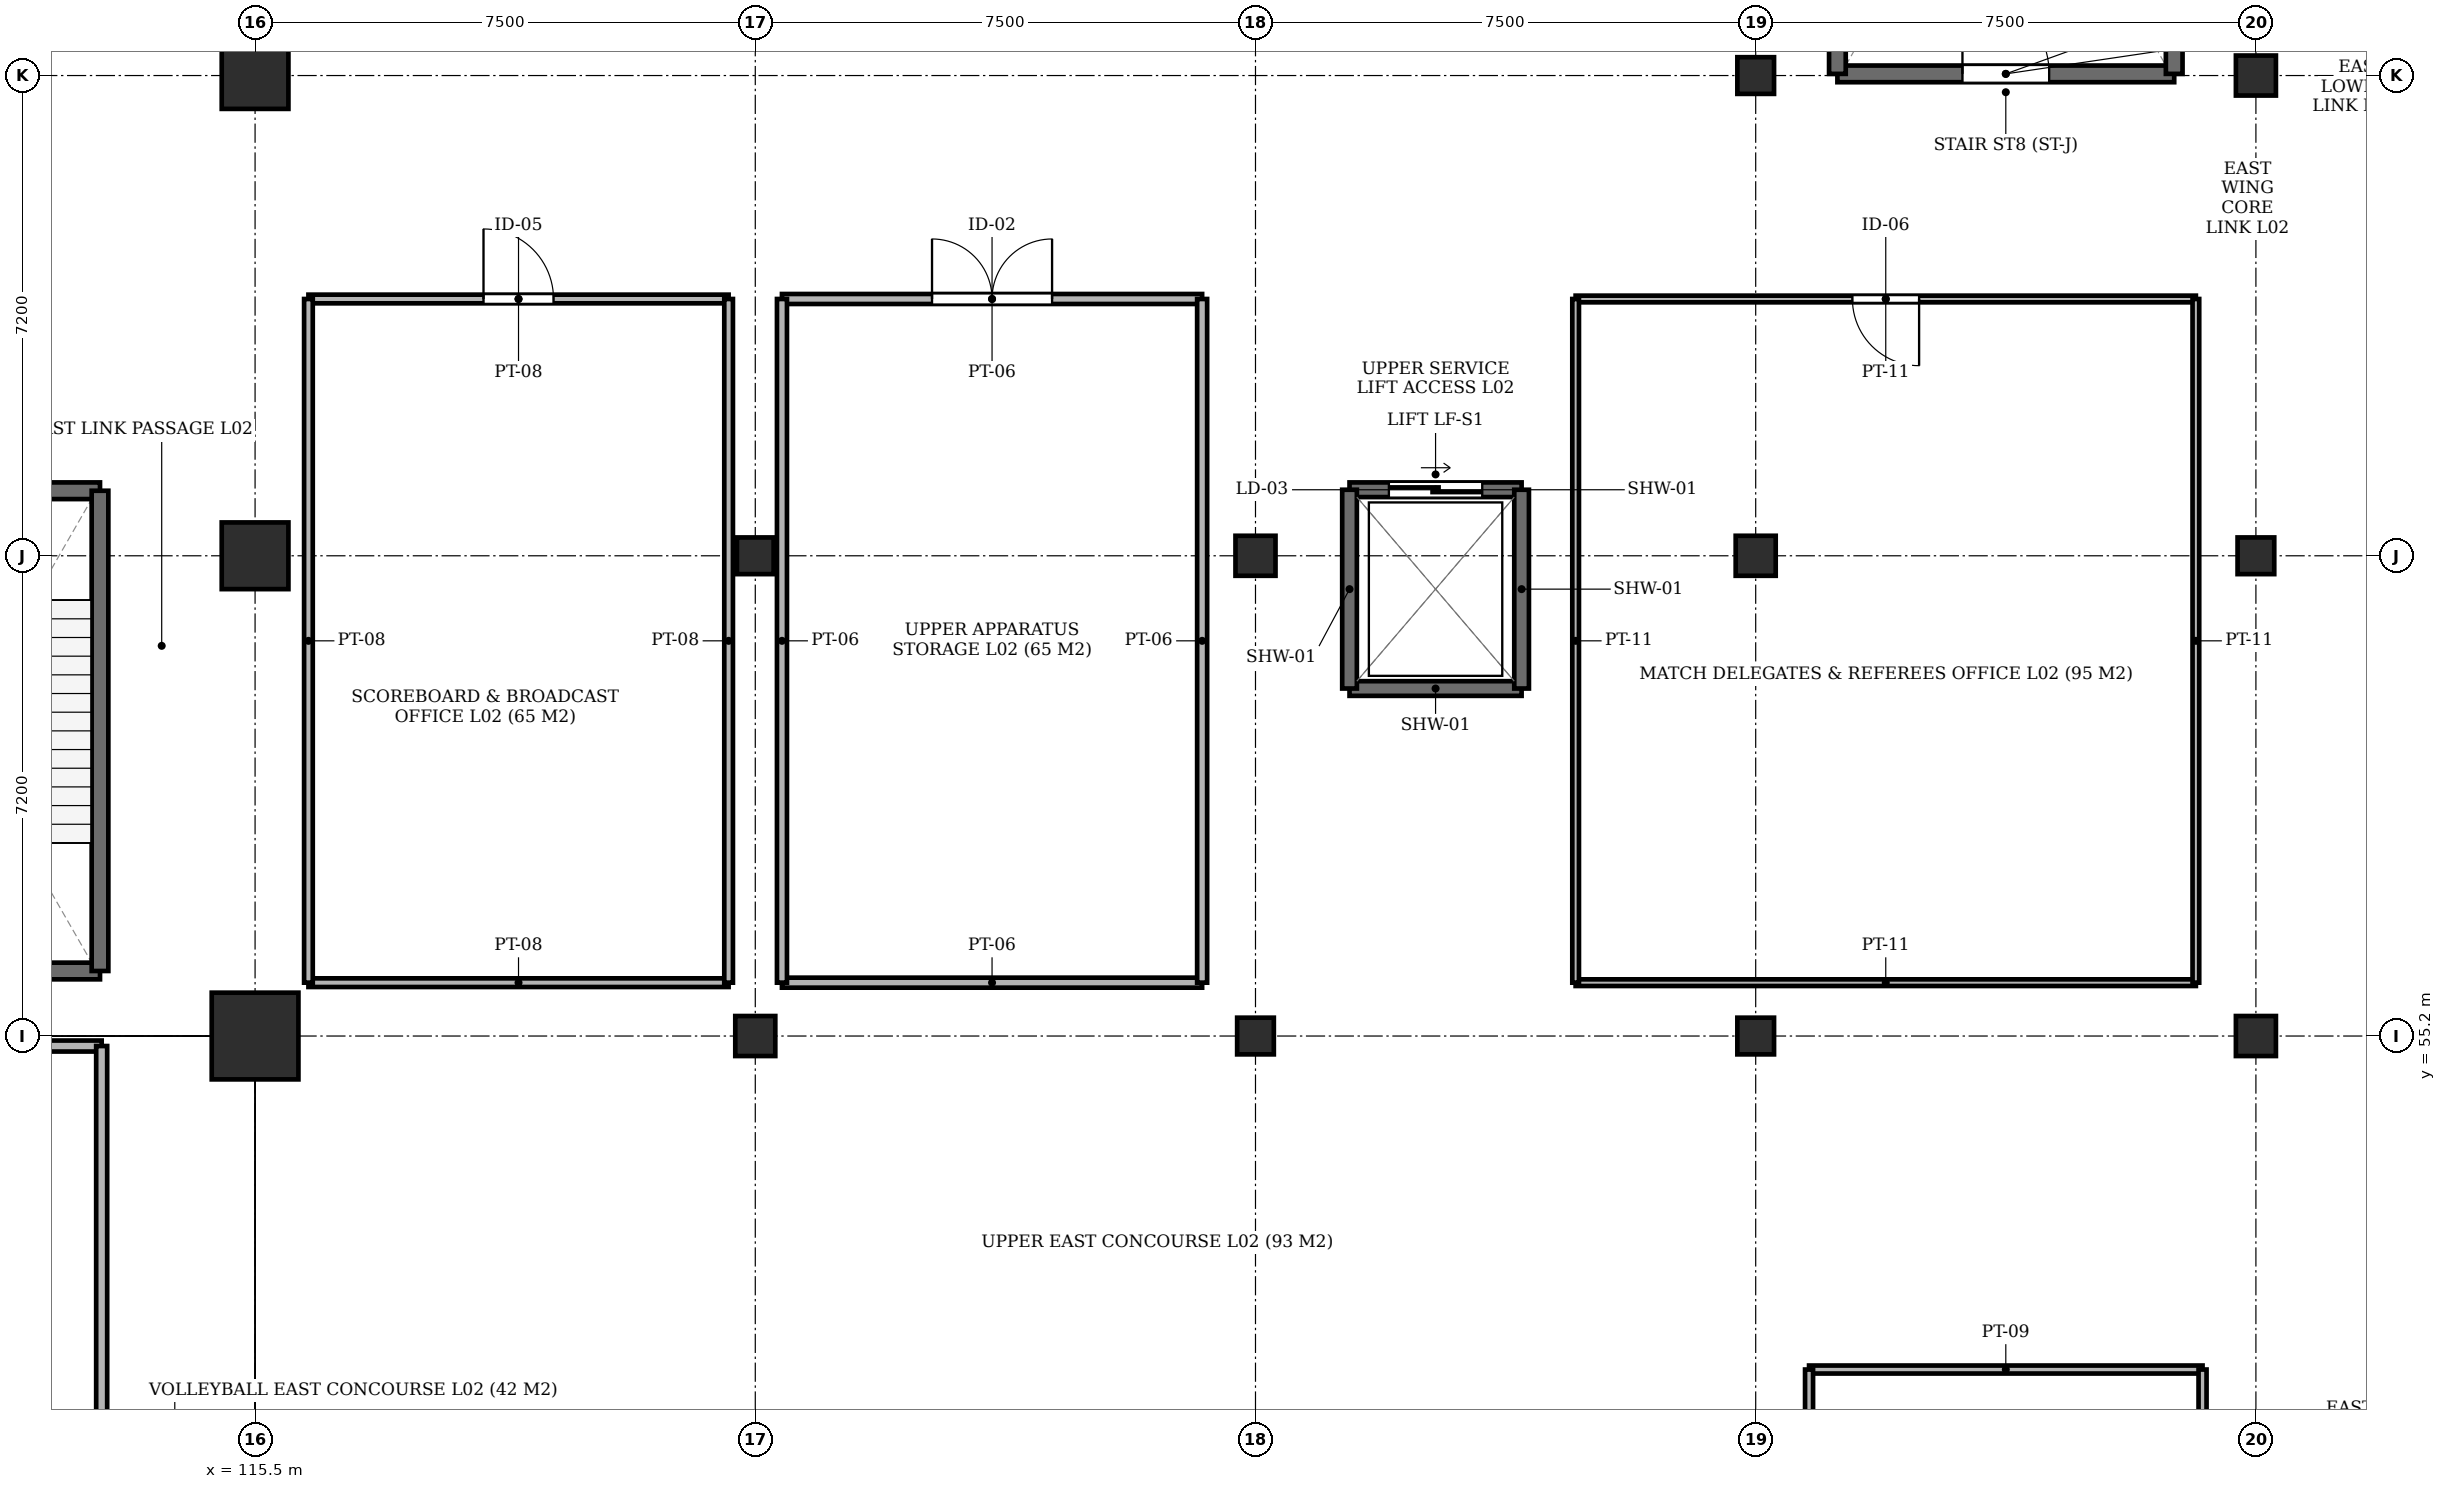
"""IFC4 building model, lengths in metres.
Left out: names, types, materials, properties, quantities, classifications, styles, units other than length and angle.
Written with IfcOpenShell. Run it as: python <this file> out.ifc"""

import sys

from ifc_helpers import new_model, si_unit, direction, frame, frame_2d, origin, origin_2d, place, context, subcontext, project, spatial, rectangle, extrude, element, fill, save


model = new_model("IFC4")
c1 = context("Model", 3, precision=1e-05, world=origin(), true_north=direction((0.0, 1.0)))
c2 = subcontext(c1, "Body", "Model", "MODEL_VIEW")
j1 = project(units=[si_unit("LENGTHUNIT", "METRE"), si_unit("PLANEANGLEUNIT", "RADIAN")], contexts=[c1])
p1 = place(None, origin())
s1 = spatial("IfcSite", under=j1, at=p1, CompositionType="ELEMENT")
p2 = place(p1, origin())
s2 = spatial("IfcBuilding", under=s1, at=p2, CompositionType="ELEMENT")
p3 = place(p2, frame((0.0, 0.0, 9.4)))
s3 = spatial("IfcBuildingStorey", under=s2, at=p3, CompositionType="ELEMENT", Elevation=9.4)
p4 = place(p3, frame((115.5, 55.2, -0.45), z_axis=(0.0, 0.0, 1.0), x_axis=(1.0, 0.0, 0.0)))
e1 = element("IfcColumn", 1, at=p4, inside=s3, PredefinedType="COLUMN", context=c2, shape_type="SweptSolid", body=[
    extrude(rectangle(XDim=1.3, YDim=1.3, at=origin_2d()), origin(), (0.0, 0.0, 1.0), 4.77),
])
for number, where, z_axis, x_axis in (
    (2, (115.5, 62.4, -0.45), (0.0, 0.0, 1.0), (1.0, 0.0, 0.0)),
    (3, (115.5, 69.6, -0.45), (0.0, 0.0, 1.0), (1.0, 0.0, 0.0)),
):
    element("IfcColumn", number, at=place(p3, frame(where, z_axis=z_axis, x_axis=x_axis)), inside=s3, PredefinedType="COLUMN", context=c2, shape_type="SweptSolid", body=[
        extrude(rectangle(XDim=1.0, YDim=1.0, at=origin_2d()), origin(), (0.0, 0.0, 1.0), 4.77),
    ])
p5 = place(p3, frame((123.0, 55.2, -0.45), z_axis=(0.0, 0.0, 1.0), x_axis=(1.0, 0.0, 0.0)))
e4 = element("IfcColumn", 4, at=p5, inside=s3, PredefinedType="COLUMN", context=c2, shape_type="SweptSolid", body=[
    extrude(rectangle(XDim=0.6, YDim=0.6, at=origin_2d()), origin(), (0.0, 0.0, 1.0), 4.77),
])
for number, where, z_axis, x_axis in (
    (5, (123.0, 62.4, -0.45), (0.0, 0.0, 1.0), (1.0, 0.0, 0.0)),
    (6, (130.5, 55.2, -0.45), (0.0, 0.0, 1.0), (1.0, 0.0, 0.0)),
):
    element("IfcColumn", number, at=place(p3, frame(where, z_axis=z_axis, x_axis=x_axis)), inside=s3, PredefinedType="COLUMN", context=c2, shape_type="SweptSolid", body=[
        extrude(rectangle(XDim=0.55, YDim=0.55, at=origin_2d()), origin(), (0.0, 0.0, 1.0), 4.77),
    ])
p6 = place(p3, frame((130.5, 62.4, -0.45), z_axis=(0.0, 0.0, 1.0), x_axis=(1.0, 0.0, 0.0)))
e7 = element("IfcColumn", 7, at=p6, inside=s3, PredefinedType="COLUMN", context=c2, shape_type="SweptSolid", body=[
    extrude(rectangle(XDim=0.6, YDim=0.6, at=origin_2d()), origin(), (0.0, 0.0, 1.0), 4.77),
])
p7 = place(p3, frame((138.0, 55.2, -0.45), z_axis=(0.0, 0.0, 1.0), x_axis=(1.0, 0.0, 0.0)))
e8 = element("IfcColumn", 8, at=p7, inside=s3, PredefinedType="COLUMN", context=c2, shape_type="SweptSolid", body=[
    extrude(rectangle(XDim=0.55, YDim=0.55, at=origin_2d()), origin(), (0.0, 0.0, 1.0), 4.77),
])
p8 = place(p3, frame((138.0, 62.4, -0.45), z_axis=(0.0, 0.0, 1.0), x_axis=(1.0, 0.0, 0.0)))
e9 = element("IfcColumn", 9, at=p8, inside=s3, PredefinedType="COLUMN", context=c2, shape_type="SweptSolid", body=[
    extrude(rectangle(XDim=0.6, YDim=0.6, at=origin_2d()), origin(), (0.0, 0.0, 1.0), 4.77),
])
p9 = place(p3, frame((138.0, 69.6, -0.45), z_axis=(0.0, 0.0, 1.0), x_axis=(1.0, 0.0, 0.0)))
e10 = element("IfcColumn", 10, at=p9, inside=s3, PredefinedType="COLUMN", context=c2, shape_type="SweptSolid", body=[
    extrude(rectangle(XDim=0.55, YDim=0.55, at=origin_2d()), origin(), (0.0, 0.0, 1.0), 4.77),
])
p10 = place(p3, frame((145.5, 55.2, -0.45), z_axis=(0.0, 0.0, 1.0), x_axis=(1.0, 0.0, 0.0)))
e11 = element("IfcColumn", 11, at=p10, inside=s3, PredefinedType="COLUMN", context=c2, shape_type="SweptSolid", body=[
    extrude(rectangle(XDim=0.6, YDim=0.6, at=origin_2d()), origin(), (0.0, 0.0, 1.0), 4.77),
])
p11 = place(p3, frame((145.5, 62.4, -0.45), z_axis=(0.0, 0.0, 1.0), x_axis=(1.0, 0.0, 0.0)))
e12 = element("IfcColumn", 12, at=p11, inside=s3, PredefinedType="COLUMN", context=c2, shape_type="SweptSolid", body=[
    extrude(rectangle(XDim=0.55, YDim=0.55, at=origin_2d()), origin(), (0.0, 0.0, 1.0), 4.77),
])
p12 = place(p3, frame((145.5, 69.6, -0.45), z_axis=(0.0, 0.0, 1.0), x_axis=(1.0, 0.0, 0.0)))
e13 = element("IfcColumn", 13, at=p12, inside=s3, PredefinedType="COLUMN", context=c2, shape_type="SweptSolid", body=[
    extrude(rectangle(XDim=0.6, YDim=0.6, at=origin_2d()), origin(), (0.0, 0.0, 1.0), 4.77),
])
p13 = place(p3, frame((139.225, 69.625, 0.0), z_axis=(0.0, 0.0, 1.0), x_axis=(1.0, 0.0, 0.0)))
e14 = element("IfcWall", 14, at=p13, inside=s3, PredefinedType="SHEAR", context=c2, shape_type="SweptSolid", body=[
    extrude(rectangle(XDim=5.05, YDim=0.25, at=frame_2d((2.525, 0.0))), origin(), (0.0, 0.0, 1.0), 4.32),
])
p14 = place(p13, frame((1.875, 0.0, 0.0)))
e15 = element("IfcOpeningElement", 15, at=p14, cuts=e14, PredefinedType="OPENING", context=c2, shape_type="SweptSolid", body=[
    extrude(rectangle(XDim=1.3, YDim=2.2, at=frame_2d((0.65, 1.1))), frame((0.0, 0.137, 0.0), z_axis=(0.0, -1.0, 0.0), x_axis=(1.0, 0.0, 0.0)), (0.0, 0.0, 1.0), 0.274),
])
for number, where, z_axis, x_axis in (
    (16, (139.225, 78.325, 0.0), (0.0, 0.0, 1.0), (0.0, -1.0, 0.0)),
    (17, (144.275, 69.625, 0.0), (0.0, 0.0, 1.0), (0.0, 1.0, 0.0)),
):
    element("IfcWall", number, at=place(p3, frame(where, z_axis=z_axis, x_axis=x_axis)), inside=s3, PredefinedType="SHEAR", context=c2, shape_type="SweptSolid", body=[
        extrude(rectangle(XDim=8.7, YDim=0.25, at=frame_2d((4.35, 0.0))), origin(), (0.0, 0.0, 1.0), 4.32),
    ])
p15 = place(p3, frame((108.925, 56.175, 0.0), z_axis=(0.0, 0.0, 1.0), x_axis=(1.0, 0.0, 0.0)))
e18 = element("IfcWall", 18, at=p15, inside=s3, PredefinedType="SHEAR", context=c2, shape_type="SweptSolid", body=[
    extrude(rectangle(XDim=4.25, YDim=0.25, at=frame_2d((2.125, 0.0))), origin(), (0.0, 0.0, 1.0), 4.32),
])
p16 = place(p3, frame((113.175, 63.375, 0.0), z_axis=(0.0, 0.0, 1.0), x_axis=(-1.0, 0.0, 0.0)))
e19 = element("IfcWall", 19, at=p16, inside=s3, PredefinedType="SHEAR", context=c2, shape_type="SweptSolid", body=[
    extrude(rectangle(XDim=4.25, YDim=0.25, at=frame_2d((2.125, 0.0))), origin(), (0.0, 0.0, 1.0), 4.32),
])
p17 = place(p16, frame((1.525, 0.0, 0.0)))
e20 = element("IfcOpeningElement", 20, at=p17, cuts=e19, PredefinedType="OPENING", context=c2, shape_type="SweptSolid", body=[
    extrude(rectangle(XDim=1.2, YDim=2.2, at=frame_2d((0.6, 1.1))), frame((0.0, 0.137, 0.0), z_axis=(0.0, -1.0, 0.0), x_axis=(1.0, 0.0, 0.0)), (0.0, 0.0, 1.0), 0.274),
])
p18 = place(p3, frame((113.175, 56.175, 0.0), z_axis=(0.0, 0.0, 1.0), x_axis=(0.0, 1.0, 0.0)))
e21 = element("IfcWall", 21, at=p18, inside=s3, PredefinedType="SHEAR", context=c2, shape_type="SweptSolid", body=[
    extrude(rectangle(XDim=7.2, YDim=0.25, at=frame_2d((3.6, 0.0))), origin(), (0.0, 0.0, 1.0), 4.32),
])
p19 = place(p3, frame((131.91, 60.41, 0.0), z_axis=(0.0, 0.0, 1.0), x_axis=(1.0, 0.0, 0.0)))
e22 = element("IfcWall", 22, at=p19, inside=s3, PredefinedType="SHEAR", context=c2, shape_type="SweptSolid", body=[
    extrude(rectangle(XDim=2.58, YDim=0.22, at=frame_2d((1.29, 0.0))), origin(), (0.0, 0.0, 1.0), 4.32),
])
p20 = place(p3, frame((134.49, 63.39, 0.0), z_axis=(0.0, 0.0, 1.0), x_axis=(-1.0, 0.0, 0.0)))
e23 = element("IfcWall", 23, at=p20, inside=s3, PredefinedType="SHEAR", context=c2, shape_type="SweptSolid", body=[
    extrude(rectangle(XDim=2.58, YDim=0.22, at=frame_2d((1.29, 0.0))), origin(), (0.0, 0.0, 1.0), 4.32),
])
p21 = place(p20, frame((0.59, 0.0, 0.0)))
e24 = element("IfcOpeningElement", 24, at=p21, cuts=e23, PredefinedType="OPENING", context=c2, shape_type="SweptSolid", body=[
    extrude(rectangle(XDim=1.4, YDim=2.3, at=frame_2d((0.7, 1.15))), frame((0.0, 0.122, 0.0), z_axis=(0.0, -1.0, 0.0), x_axis=(1.0, 0.0, 0.0)), (0.0, 0.0, 1.0), 0.244),
])
for number, where, z_axis, x_axis in (
    (25, (131.91, 63.39, 0.0), (0.0, 0.0, 1.0), (0.0, -1.0, 0.0)),
    (26, (134.49, 60.41, 0.0), (0.0, 0.0, 1.0), (0.0, 1.0, 0.0)),
):
    element("IfcWall", number, at=place(p3, frame(where, z_axis=z_axis, x_axis=x_axis)), inside=s3, PredefinedType="SHEAR", context=c2, shape_type="SweptSolid", body=[
        extrude(rectangle(XDim=2.98, YDim=0.22, at=frame_2d((1.49, 0.0))), origin(), (0.0, 0.0, 1.0), 4.32),
    ])
p22 = place(p3, frame((108.73, 55.05, 0.0), z_axis=(0.0, 0.0, 1.0), x_axis=(1.0, 0.0, 0.0)))
e27 = element("IfcWall", 27, at=p22, inside=s3, PredefinedType="PARTITIONING", context=c2, shape_type="SweptSolid", body=[
    extrude(rectangle(XDim=4.47, YDim=0.165, at=frame_2d((2.235, 0.0))), origin(), (0.0, 0.0, 1.0), 3.8),
])
p23 = place(p3, frame((113.2, 28.95, 0.0), z_axis=(0.0, 0.0, 1.0), x_axis=(0.0, 1.0, 0.0)))
e28 = element("IfcWall", 28, at=p23, inside=s3, PredefinedType="PARTITIONING", context=c2, shape_type="SweptSolid", body=[
    extrude(rectangle(XDim=26.1, YDim=0.165, at=frame_2d((13.05, 0.0))), origin(), (0.0, 0.0, 1.0), 3.88),
])
p24 = place(p23, frame((12.05, 0.0, 0.0)))
e29 = element("IfcOpeningElement", 29, at=p24, cuts=e28, PredefinedType="OPENING", context=c2, shape_type="SweptSolid", body=[
    extrude(rectangle(XDim=2.0, YDim=2.35, at=frame_2d((1.0, 1.175))), frame((0.0, 0.094, 0.0), z_axis=(0.0, -1.0, 0.0), x_axis=(1.0, 0.0, 0.0)), (0.0, 0.0, 1.0), 0.189),
])
p25 = place(p3, frame((116.3, 56.0, 0.0), z_axis=(0.0, 0.0, 1.0), x_axis=(1.0, 0.0, 0.0)))
e30 = element("IfcWall", 30, at=p25, inside=s3, PredefinedType="PARTITIONING", context=c2, shape_type="SweptSolid", body=[
    extrude(rectangle(XDim=6.3, YDim=0.13, at=frame_2d((3.15, 0.0))), origin(), (0.0, 0.0, 1.0), 3.88),
])
p26 = place(p3, frame((116.3, 66.25, 0.0), z_axis=(0.0, 0.0, 1.0), x_axis=(1.0, 0.0, 0.0)))
e31 = element("IfcWall", 31, at=p26, inside=s3, PredefinedType="PARTITIONING", context=c2, shape_type="SweptSolid", body=[
    extrude(rectangle(XDim=6.3, YDim=0.13, at=frame_2d((3.15, 0.0))), origin(), (0.0, 0.0, 1.0), 3.88),
])
p27 = place(p26, frame((2.625, 0.0, 0.0)))
e32 = element("IfcOpeningElement", 32, at=p27, cuts=e31, PredefinedType="OPENING", context=c2, shape_type="SweptSolid", body=[
    extrude(rectangle(XDim=1.05, YDim=2.15, at=frame_2d((0.525, 1.075))), frame((0.0, 0.077, 0.0), z_axis=(0.0, -1.0, 0.0), x_axis=(1.0, 0.0, 0.0)), (0.0, 0.0, 1.0), 0.154),
])
for number, where, z_axis, x_axis in (
    (33, (116.3, 56.0, 0.0), (0.0, 0.0, 1.0), (0.0, 1.0, 0.0)),
    (34, (122.6, 56.0, 0.0), (0.0, 0.0, 1.0), (0.0, 1.0, 0.0)),
):
    element("IfcWall", number, at=place(p3, frame(where, z_axis=z_axis, x_axis=x_axis)), inside=s3, PredefinedType="PARTITIONING", context=c2, shape_type="SweptSolid", body=[
        extrude(rectangle(XDim=10.25, YDim=0.13, at=frame_2d((5.125, 0.0))), origin(), (0.0, 0.0, 1.0), 3.88),
    ])
p28 = place(p3, frame((123.4, 56.0, 0.0), z_axis=(0.0, 0.0, 1.0), x_axis=(1.0, 0.0, 0.0)))
e35 = element("IfcWall", 35, at=p28, inside=s3, PredefinedType="PARTITIONING", context=c2, shape_type="SweptSolid", body=[
    extrude(rectangle(XDim=6.3, YDim=0.15, at=frame_2d((3.15, 0.0))), origin(), (0.0, 0.0, 1.0), 3.88),
])
p29 = place(p3, frame((123.4, 66.25, 0.0), z_axis=(0.0, 0.0, 1.0), x_axis=(1.0, 0.0, 0.0)))
e36 = element("IfcWall", 36, at=p29, inside=s3, PredefinedType="PARTITIONING", context=c2, shape_type="SweptSolid", body=[
    extrude(rectangle(XDim=6.3, YDim=0.15, at=frame_2d((3.15, 0.0))), origin(), (0.0, 0.0, 1.0), 3.88),
])
p30 = place(p29, frame((2.25, 0.0, 0.0)))
e37 = element("IfcOpeningElement", 37, at=p30, cuts=e36, PredefinedType="OPENING", context=c2, shape_type="SweptSolid", body=[
    extrude(rectangle(XDim=1.8, YDim=2.25, at=frame_2d((0.9, 1.125))), frame((0.0, 0.087, 0.0), z_axis=(0.0, -1.0, 0.0), x_axis=(1.0, 0.0, 0.0)), (0.0, 0.0, 1.0), 0.174),
])
for number, where, z_axis, x_axis in (
    (38, (123.4, 56.0, 0.0), (0.0, 0.0, 1.0), (0.0, 1.0, 0.0)),
    (39, (129.7, 56.0, 0.0), (0.0, 0.0, 1.0), (0.0, 1.0, 0.0)),
):
    element("IfcWall", number, at=place(p3, frame(where, z_axis=z_axis, x_axis=x_axis)), inside=s3, PredefinedType="PARTITIONING", context=c2, shape_type="SweptSolid", body=[
        extrude(rectangle(XDim=10.25, YDim=0.15, at=frame_2d((5.125, 0.0))), origin(), (0.0, 0.0, 1.0), 3.88),
    ])
p31 = place(p3, frame((135.3, 56.0, 0.0), z_axis=(0.0, 0.0, 1.0), x_axis=(1.0, 0.0, 0.0)))
e40 = element("IfcWall", 40, at=p31, inside=s3, PredefinedType="PARTITIONING", context=c2, shape_type="SweptSolid", body=[
    extrude(rectangle(XDim=9.3, YDim=0.1, at=frame_2d((4.65, 0.0))), origin(), (0.0, 0.0, 1.0), 3.88),
])
p32 = place(p3, frame((135.3, 66.25, 0.0), z_axis=(0.0, 0.0, 1.0), x_axis=(1.0, 0.0, 0.0)))
e41 = element("IfcWall", 41, at=p32, inside=s3, PredefinedType="PARTITIONING", context=c2, shape_type="SweptSolid", body=[
    extrude(rectangle(XDim=9.3, YDim=0.1, at=frame_2d((4.65, 0.0))), origin(), (0.0, 0.0, 1.0), 3.88),
])
p33 = place(p32, frame((4.15, 0.0, 0.0)))
e42 = element("IfcOpeningElement", 42, at=p33, cuts=e41, PredefinedType="OPENING", context=c2, shape_type="SweptSolid", body=[
    extrude(rectangle(XDim=1.0, YDim=2.15, at=frame_2d((0.5, 1.075))), frame((0.0, 0.062, 0.0), z_axis=(0.0, -1.0, 0.0), x_axis=(1.0, 0.0, 0.0)), (0.0, 0.0, 1.0), 0.124),
])
for number, where, z_axis, x_axis in (
    (43, (135.3, 56.0, 0.0), (0.0, 0.0, 1.0), (0.0, 1.0, 0.0)),
    (44, (144.6, 56.0, 0.0), (0.0, 0.0, 1.0), (0.0, 1.0, 0.0)),
):
    element("IfcWall", number, at=place(p3, frame(where, z_axis=z_axis, x_axis=x_axis)), inside=s3, PredefinedType="PARTITIONING", context=c2, shape_type="SweptSolid", body=[
        extrude(rectangle(XDim=10.25, YDim=0.1, at=frame_2d((5.125, 0.0))), origin(), (0.0, 0.0, 1.0), 3.88),
    ])
p34 = place(p3, frame((138.8, 50.2, 0.0), z_axis=(0.0, 0.0, 1.0), x_axis=(1.0, 0.0, 0.0)))
e45 = element("IfcWall", 45, at=p34, inside=s3, PredefinedType="PARTITIONING", context=c2, shape_type="SweptSolid", body=[
    extrude(rectangle(XDim=5.9, YDim=0.12, at=frame_2d((2.95, 0.0))), origin(), (0.0, 0.0, 1.0), 3.88),
])
for number, where, z_axis, x_axis in (
    (46, (138.8, 27.2, 0.0), (0.0, 0.0, 1.0), (0.0, 1.0, 0.0)),
    (47, (144.7, 27.2, 0.0), (0.0, 0.0, 1.0), (0.0, 1.0, 0.0)),
):
    element("IfcWall", number, at=place(p3, frame(where, z_axis=z_axis, x_axis=x_axis)), inside=s3, PredefinedType="PARTITIONING", context=c2, shape_type="SweptSolid", body=[
        extrude(rectangle(XDim=23.0, YDim=0.12, at=frame_2d((11.5, 0.0))), origin(), (0.0, 0.0, 1.0), 3.88),
    ])
p35 = place(p14, origin())
e48 = element("IfcDoor", 48, at=p35, inside=s3, OperationType="SINGLE_SWING_LEFT", PredefinedType="DOOR", context=c2, shape_type="SweptSolid", body=[
    extrude(rectangle(XDim=1.3, YDim=2.2, at=frame_2d((0.65, 1.1))), frame((0.0, 0.025, 0.0), z_axis=(0.0, -1.0, 0.0), x_axis=(1.0, 0.0, 0.0)), (0.0, 0.0, 1.0), 0.05),
])
fill(e15, e48)
p36 = place(p21, origin())
e49 = element("IfcDoor", 49, at=p36, inside=s3, OperationType="SLIDING_TO_LEFT", PredefinedType="DOOR", context=c2, shape_type="SweptSolid", body=[
    extrude(rectangle(XDim=1.4, YDim=2.3, at=frame_2d((0.7, 1.15))), frame((0.0, 0.025, 0.0), z_axis=(0.0, -1.0, 0.0), x_axis=(1.0, 0.0, 0.0)), (0.0, 0.0, 1.0), 0.05),
])
fill(e24, e49)
p37 = place(p27, origin())
e50 = element("IfcDoor", 50, at=p37, inside=s3, OperationType="SINGLE_SWING_LEFT", PredefinedType="DOOR", context=c2, shape_type="SweptSolid", body=[
    extrude(rectangle(XDim=1.05, YDim=2.15, at=frame_2d((0.525, 1.075))), frame((0.0, 0.025, 0.0), z_axis=(0.0, -1.0, 0.0), x_axis=(1.0, 0.0, 0.0)), (0.0, 0.0, 1.0), 0.05),
])
fill(e32, e50)
p38 = place(p30, origin())
e51 = element("IfcDoor", 51, at=p38, inside=s3, OperationType="DOUBLE_DOOR_SINGLE_SWING", PredefinedType="DOOR", context=c2, shape_type="SweptSolid", body=[
    extrude(rectangle(XDim=1.8, YDim=2.25, at=frame_2d((0.9, 1.125))), frame((0.0, 0.025, 0.0), z_axis=(0.0, -1.0, 0.0), x_axis=(1.0, 0.0, 0.0)), (0.0, 0.0, 1.0), 0.05),
])
fill(e37, e51)
p39 = place(p33, frame((1.0, 0.0, 0.0), z_axis=(0.0, 0.0, 1.0), x_axis=(-1.0, 0.0, 0.0)))
e52 = element("IfcDoor", 52, at=p39, inside=s3, OperationType="SINGLE_SWING_RIGHT", PredefinedType="DOOR", context=c2, shape_type="SweptSolid", body=[
    extrude(rectangle(XDim=1.0, YDim=2.15, at=frame_2d((0.5, 1.075))), frame((0.0, 0.025, 0.0), z_axis=(0.0, -1.0, 0.0), x_axis=(1.0, 0.0, 0.0)), (0.0, 0.0, 1.0), 0.05),
])
fill(e42, e52)
save(model, sys.argv[1])
